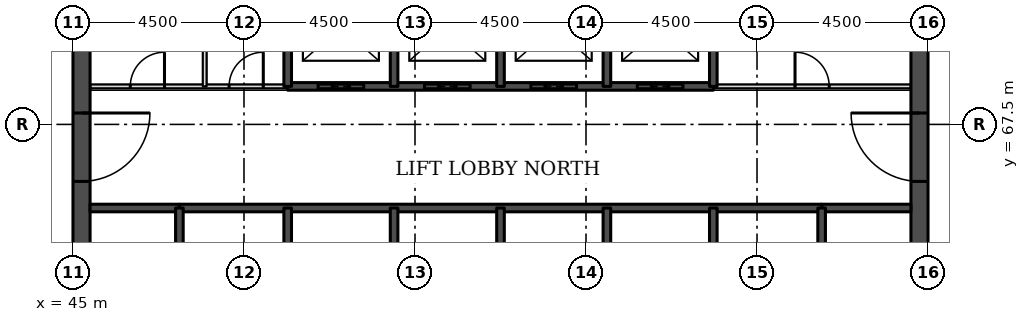
"""IFC4 building model, lengths in metres.
Left out: names, types, materials, properties, quantities, classifications, styles, units other than length and angle.
Written with IfcOpenShell. Run it as: python <this file> out.ifc"""

import sys

from ifc_helpers import new_model, si_unit, direction, frame, frame_2d, origin, place, context, subcontext, project, spatial, rectangle, extrude, element, fill, save


model = new_model("IFC4")
c1 = context("Model", 3, precision=1e-05, world=origin(), true_north=direction((0.0, 1.0)))
c2 = subcontext(c1, "Body", "Model", "MODEL_VIEW")
j1 = project(units=[si_unit("LENGTHUNIT", "METRE"), si_unit("PLANEANGLEUNIT", "RADIAN")], contexts=[c1])
p1 = place(None, origin())
s1 = spatial("IfcSite", under=j1, at=p1, CompositionType="ELEMENT")
p2 = place(p1, origin())
s2 = spatial("IfcBuilding", under=s1, at=p2, CompositionType="ELEMENT")
p3 = place(p2, frame((0.0, 0.0, 74.3)))
s3 = spatial("IfcBuildingStorey", under=s2, at=p3, CompositionType="ELEMENT", Elevation=74.3)
p4 = place(p3, frame((45.225, 49.5, 0.0), z_axis=(0.0, 0.0, 1.0), x_axis=(0.0, 1.0, 0.0)))
e1 = element("IfcWall", 1, at=p4, inside=s3, PredefinedType="SHEAR", context=c2, shape_type="SweptSolid", body=[
    extrude(rectangle(XDim=22.5, YDim=0.45, at=frame_2d((11.25, 0.0))), origin(), (0.0, 0.0, 1.0), 4.6),
])
p5 = place(p4, frame((4.2, 0.0, 0.0)))
e2 = element("IfcOpeningElement", 2, at=p5, cuts=e1, PredefinedType="OPENING", context=c2, shape_type="SweptSolid", body=[
    extrude(rectangle(XDim=1.8, YDim=2.1, at=frame_2d((0.9, 1.05))), frame((0.0, 0.235, 0.0), z_axis=(0.0, -1.0, 0.0), x_axis=(1.0, 0.0, 0.0)), (0.0, 0.0, 1.0), 0.47),
])
p6 = place(p4, frame((6.9, 0.0, 0.0)))
e3 = element("IfcOpeningElement", 3, at=p6, cuts=e1, PredefinedType="OPENING", context=c2, shape_type="SweptSolid", body=[
    extrude(rectangle(XDim=1.1, YDim=2.1, at=frame_2d((0.55, 1.05))), frame((0.0, 0.235, 0.0), z_axis=(0.0, -1.0, 0.0), x_axis=(1.0, 0.0, 0.0)), (0.0, 0.0, 1.0), 0.47),
])
p7 = place(p4, frame((13.6, 0.0, 0.0)))
e4 = element("IfcOpeningElement", 4, at=p7, cuts=e1, PredefinedType="OPENING", context=c2, shape_type="SweptSolid", body=[
    extrude(rectangle(XDim=1.1, YDim=2.1, at=frame_2d((0.55, 1.05))), frame((0.0, 0.235, 0.0), z_axis=(0.0, -1.0, 0.0), x_axis=(1.0, 0.0, 0.0)), (0.0, 0.0, 1.0), 0.47),
])
p8 = place(p4, frame((16.5, 0.0, 0.0)))
e5 = element("IfcOpeningElement", 5, at=p8, cuts=e1, PredefinedType="OPENING", context=c2, shape_type="SweptSolid", body=[
    extrude(rectangle(XDim=1.8, YDim=2.1, at=frame_2d((0.9, 1.05))), frame((0.0, 0.235, 0.0), z_axis=(0.0, -1.0, 0.0), x_axis=(1.0, 0.0, 0.0)), (0.0, 0.0, 1.0), 0.47),
])
p9 = place(p3, frame((67.275, 49.5, 0.0), z_axis=(0.0, 0.0, 1.0), x_axis=(0.0, 1.0, 0.0)))
e6 = element("IfcWall", 6, at=p9, inside=s3, PredefinedType="SHEAR", context=c2, shape_type="SweptSolid", body=[
    extrude(rectangle(XDim=22.5, YDim=0.45, at=frame_2d((11.25, 0.0))), origin(), (0.0, 0.0, 1.0), 4.6),
])
p10 = place(p9, frame((4.2, 0.0, 0.0)))
e7 = element("IfcOpeningElement", 7, at=p10, cuts=e6, PredefinedType="OPENING", context=c2, shape_type="SweptSolid", body=[
    extrude(rectangle(XDim=1.8, YDim=2.1, at=frame_2d((0.9, 1.05))), frame((0.0, 0.235, 0.0), z_axis=(0.0, -1.0, 0.0), x_axis=(1.0, 0.0, 0.0)), (0.0, 0.0, 1.0), 0.47),
])
p11 = place(p9, frame((6.9, 0.0, 0.0)))
e8 = element("IfcOpeningElement", 8, at=p11, cuts=e6, PredefinedType="OPENING", context=c2, shape_type="SweptSolid", body=[
    extrude(rectangle(XDim=1.1, YDim=2.1, at=frame_2d((0.55, 1.05))), frame((0.0, 0.235, 0.0), z_axis=(0.0, -1.0, 0.0), x_axis=(1.0, 0.0, 0.0)), (0.0, 0.0, 1.0), 0.47),
])
p12 = place(p9, frame((13.6, 0.0, 0.0)))
e9 = element("IfcOpeningElement", 9, at=p12, cuts=e6, PredefinedType="OPENING", context=c2, shape_type="SweptSolid", body=[
    extrude(rectangle(XDim=1.1, YDim=2.1, at=frame_2d((0.55, 1.05))), frame((0.0, 0.235, 0.0), z_axis=(0.0, -1.0, 0.0), x_axis=(1.0, 0.0, 0.0)), (0.0, 0.0, 1.0), 0.47),
])
p13 = place(p9, frame((16.5, 0.0, 0.0)))
e10 = element("IfcOpeningElement", 10, at=p13, cuts=e6, PredefinedType="OPENING", context=c2, shape_type="SweptSolid", body=[
    extrude(rectangle(XDim=1.8, YDim=2.1, at=frame_2d((0.9, 1.05))), frame((0.0, 0.235, 0.0), z_axis=(0.0, -1.0, 0.0), x_axis=(1.0, 0.0, 0.0)), (0.0, 0.0, 1.0), 0.47),
])
for number, where, z_axis, x_axis in (
    (11, (45.45, 65.3, 0.0), (0.0, 0.0, 1.0), (1.0, 0.0, 0.0)),
    (12, (64.7, 65.3, 0.0), (0.0, 0.0, 1.0), (1.0, 0.0, 0.0)),
):
    element("IfcWall", number, at=place(p3, frame(where, z_axis=z_axis, x_axis=x_axis)), inside=s3, PredefinedType="SOLIDWALL", context=c2, shape_type="SweptSolid", body=[
        extrude(rectangle(XDim=2.35, YDim=0.2, at=frame_2d((1.175, 0.0))), origin(), (0.0, 0.0, 1.0), 4.45),
    ])
p14 = place(p3, frame((47.8, 65.3, 0.0), z_axis=(0.0, 0.0, 1.0), x_axis=(1.0, 0.0, 0.0)))
e13 = element("IfcWall", 13, at=p14, inside=s3, PredefinedType="SOLIDWALL", context=c2, shape_type="SweptSolid", body=[
    extrude(rectangle(XDim=16.9, YDim=0.2, at=frame_2d((8.45, 0.0))), origin(), (0.0, 0.0, 1.0), 4.45),
])
p15 = place(p3, frame((45.45, 68.5, 0.0), z_axis=(0.0, 0.0, 1.0), x_axis=(1.0, 0.0, 0.0)))
e14 = element("IfcWall", 14, at=p15, inside=s3, PredefinedType="PARTITIONING", context=c2, shape_type="SweptSolid", body=[
    extrude(rectangle(XDim=5.2, YDim=0.1, at=frame_2d((2.6, 0.0))), origin(), (0.0, 0.0, 1.0), 4.45),
])
p16 = place(p15, frame((1.058, 0.0, 0.0)))
e15 = element("IfcOpeningElement", 15, at=p16, cuts=e14, PredefinedType="OPENING", context=c2, shape_type="SweptSolid", body=[
    extrude(rectangle(XDim=0.9, YDim=2.1, at=frame_2d((0.45, 1.05))), frame((0.0, 0.06, 0.0), z_axis=(0.0, -1.0, 0.0), x_axis=(1.0, 0.0, 0.0)), (0.0, 0.0, 1.0), 0.12),
])
p17 = place(p15, frame((3.658, 0.0, 0.0)))
e16 = element("IfcOpeningElement", 16, at=p17, cuts=e14, PredefinedType="OPENING", context=c2, shape_type="SweptSolid", body=[
    extrude(rectangle(XDim=0.9, YDim=2.1, at=frame_2d((0.45, 1.05))), frame((0.0, 0.06, 0.0), z_axis=(0.0, -1.0, 0.0), x_axis=(1.0, 0.0, 0.0)), (0.0, 0.0, 1.0), 0.12),
])
p18 = place(p3, frame((61.85, 68.5, 0.0), z_axis=(0.0, 0.0, 1.0), x_axis=(1.0, 0.0, 0.0)))
e17 = element("IfcWall", 17, at=p18, inside=s3, PredefinedType="PARTITIONING", context=c2, shape_type="SweptSolid", body=[
    extrude(rectangle(XDim=5.2, YDim=0.1, at=frame_2d((2.6, 0.0))), origin(), (0.0, 0.0, 1.0), 4.45),
])
p19 = place(p18, frame((2.15, 0.0, 0.0)))
e18 = element("IfcOpeningElement", 18, at=p19, cuts=e17, PredefinedType="OPENING", context=c2, shape_type="SweptSolid", body=[
    extrude(rectangle(XDim=0.9, YDim=2.1, at=frame_2d((0.45, 1.05))), frame((0.0, 0.06, 0.0), z_axis=(0.0, -1.0, 0.0), x_axis=(1.0, 0.0, 0.0)), (0.0, 0.0, 1.0), 0.12),
])
p20 = place(p3, frame((50.65, 68.5, 0.0), z_axis=(0.0, 0.0, 1.0), x_axis=(1.0, 0.0, 0.0)))
e19 = element("IfcWall", 19, at=p20, inside=s3, PredefinedType="SOLIDWALL", context=c2, shape_type="SweptSolid", body=[
    extrude(rectangle(XDim=11.2, YDim=0.2, at=frame_2d((5.6, 0.0))), origin(), (0.0, 0.0, 1.0), 4.45),
])
p21 = place(p20, frame((0.8, 0.0, 0.0)))
e20 = element("IfcOpeningElement", 20, at=p21, cuts=e19, PredefinedType="OPENING", context=c2, shape_type="SweptSolid", body=[
    extrude(rectangle(XDim=1.2, YDim=2.1, at=frame_2d((0.6, 1.05))), frame((0.0, 0.11, 0.0), z_axis=(0.0, -1.0, 0.0), x_axis=(1.0, 0.0, 0.0)), (0.0, 0.0, 1.0), 0.22),
])
p22 = place(p20, frame((3.6, 0.0, 0.0)))
e21 = element("IfcOpeningElement", 21, at=p22, cuts=e19, PredefinedType="OPENING", context=c2, shape_type="SweptSolid", body=[
    extrude(rectangle(XDim=1.2, YDim=2.1, at=frame_2d((0.6, 1.05))), frame((0.0, 0.11, 0.0), z_axis=(0.0, -1.0, 0.0), x_axis=(1.0, 0.0, 0.0)), (0.0, 0.0, 1.0), 0.22),
])
p23 = place(p20, frame((6.4, 0.0, 0.0)))
e22 = element("IfcOpeningElement", 22, at=p23, cuts=e19, PredefinedType="OPENING", context=c2, shape_type="SweptSolid", body=[
    extrude(rectangle(XDim=1.2, YDim=2.1, at=frame_2d((0.6, 1.05))), frame((0.0, 0.11, 0.0), z_axis=(0.0, -1.0, 0.0), x_axis=(1.0, 0.0, 0.0)), (0.0, 0.0, 1.0), 0.22),
])
p24 = place(p20, frame((9.2, 0.0, 0.0)))
e23 = element("IfcOpeningElement", 23, at=p24, cuts=e19, PredefinedType="OPENING", context=c2, shape_type="SweptSolid", body=[
    extrude(rectangle(XDim=1.2, YDim=2.1, at=frame_2d((0.6, 1.05))), frame((0.0, 0.11, 0.0), z_axis=(0.0, -1.0, 0.0), x_axis=(1.0, 0.0, 0.0)), (0.0, 0.0, 1.0), 0.22),
])
p25 = place(p3, frame((47.8, 62.0, 0.0), z_axis=(0.0, 0.0, 1.0), x_axis=(0.0, 1.0, 0.0)))
e24 = element("IfcWall", 24, at=p25, inside=s3, PredefinedType="SOLIDWALL", context=c2, shape_type="SweptSolid", body=[
    extrude(rectangle(XDim=3.3, YDim=0.2, at=frame_2d((1.65, 0.0))), origin(), (0.0, 0.0, 1.0), 4.45),
])
p26 = place(p25, frame((1.1, 0.0, 0.0)))
e25 = element("IfcOpeningElement", 25, at=p26, cuts=e24, PredefinedType="OPENING", context=c2, shape_type="SweptSolid", body=[
    extrude(rectangle(XDim=1.1, YDim=2.1, at=frame_2d((0.55, 1.05))), frame((0.0, 0.11, 0.0), z_axis=(0.0, -1.0, 0.0), x_axis=(1.0, 0.0, 0.0)), (0.0, 0.0, 1.0), 0.22),
])
p27 = place(p3, frame((48.466, 68.5, 0.0), z_axis=(0.0, 0.0, 1.0), x_axis=(0.0, 1.0, 0.0)))
e26 = element("IfcWall", 26, at=p27, inside=s3, PredefinedType="PARTITIONING", context=c2, shape_type="SweptSolid", body=[
    extrude(rectangle(XDim=3.05, YDim=0.1, at=frame_2d((1.525, 0.0))), origin(), (0.0, 0.0, 1.0), 4.45),
])
p28 = place(p3, frame((50.65, 62.0, 0.0), z_axis=(0.0, 0.0, 1.0), x_axis=(0.0, 1.0, 0.0)))
e27 = element("IfcWall", 27, at=p28, inside=s3, PredefinedType="SOLIDWALL", context=c2, shape_type="SweptSolid", body=[
    extrude(rectangle(XDim=3.3, YDim=0.2, at=frame_2d((1.65, 0.0))), origin(), (0.0, 0.0, 1.0), 4.45),
])
p29 = place(p3, frame((50.65, 68.5, 0.0), z_axis=(0.0, 0.0, 1.0), x_axis=(0.0, 1.0, 0.0)))
e28 = element("IfcWall", 28, at=p29, inside=s3, PredefinedType="SOLIDWALL", context=c2, shape_type="SweptSolid", body=[
    extrude(rectangle(XDim=3.05, YDim=0.2, at=frame_2d((1.525, 0.0))), origin(), (0.0, 0.0, 1.0), 4.45),
])
p30 = place(p3, frame((53.45, 62.5, 0.0), z_axis=(0.0, 0.0, 1.0), x_axis=(0.0, 1.0, 0.0)))
e29 = element("IfcWall", 29, at=p30, inside=s3, PredefinedType="SOLIDWALL", context=c2, shape_type="SweptSolid", body=[
    extrude(rectangle(XDim=2.8, YDim=0.2, at=frame_2d((1.4, 0.0))), origin(), (0.0, 0.0, 1.0), 4.45),
])
p31 = place(p3, frame((53.45, 68.5, 0.0), z_axis=(0.0, 0.0, 1.0), x_axis=(0.0, 1.0, 0.0)))
e30 = element("IfcWall", 30, at=p31, inside=s3, PredefinedType="SOLIDWALL", context=c2, shape_type="SweptSolid", body=[
    extrude(rectangle(XDim=3.05, YDim=0.2, at=frame_2d((1.525, 0.0))), origin(), (0.0, 0.0, 1.0), 4.45),
])
p32 = place(p3, frame((56.25, 62.5, 0.0), z_axis=(0.0, 0.0, 1.0), x_axis=(0.0, 1.0, 0.0)))
e31 = element("IfcWall", 31, at=p32, inside=s3, PredefinedType="SOLIDWALL", context=c2, shape_type="SweptSolid", body=[
    extrude(rectangle(XDim=2.8, YDim=0.2, at=frame_2d((1.4, 0.0))), origin(), (0.0, 0.0, 1.0), 4.45),
])
p33 = place(p3, frame((56.25, 68.5, 0.0), z_axis=(0.0, 0.0, 1.0), x_axis=(0.0, 1.0, 0.0)))
e32 = element("IfcWall", 32, at=p33, inside=s3, PredefinedType="SOLIDWALL", context=c2, shape_type="SweptSolid", body=[
    extrude(rectangle(XDim=3.05, YDim=0.2, at=frame_2d((1.525, 0.0))), origin(), (0.0, 0.0, 1.0), 4.45),
])
p34 = place(p3, frame((59.05, 62.5, 0.0), z_axis=(0.0, 0.0, 1.0), x_axis=(0.0, 1.0, 0.0)))
e33 = element("IfcWall", 33, at=p34, inside=s3, PredefinedType="SOLIDWALL", context=c2, shape_type="SweptSolid", body=[
    extrude(rectangle(XDim=2.8, YDim=0.2, at=frame_2d((1.4, 0.0))), origin(), (0.0, 0.0, 1.0), 4.45),
])
p35 = place(p3, frame((59.05, 68.5, 0.0), z_axis=(0.0, 0.0, 1.0), x_axis=(0.0, 1.0, 0.0)))
e34 = element("IfcWall", 34, at=p35, inside=s3, PredefinedType="SOLIDWALL", context=c2, shape_type="SweptSolid", body=[
    extrude(rectangle(XDim=3.05, YDim=0.2, at=frame_2d((1.525, 0.0))), origin(), (0.0, 0.0, 1.0), 4.45),
])
p36 = place(p3, frame((61.85, 62.0, 0.0), z_axis=(0.0, 0.0, 1.0), x_axis=(0.0, 1.0, 0.0)))
e35 = element("IfcWall", 35, at=p36, inside=s3, PredefinedType="SOLIDWALL", context=c2, shape_type="SweptSolid", body=[
    extrude(rectangle(XDim=3.3, YDim=0.2, at=frame_2d((1.65, 0.0))), origin(), (0.0, 0.0, 1.0), 4.45),
])
p37 = place(p3, frame((61.85, 68.5, 0.0), z_axis=(0.0, 0.0, 1.0), x_axis=(0.0, 1.0, 0.0)))
e36 = element("IfcWall", 36, at=p37, inside=s3, PredefinedType="SOLIDWALL", context=c2, shape_type="SweptSolid", body=[
    extrude(rectangle(XDim=3.05, YDim=0.2, at=frame_2d((1.525, 0.0))), origin(), (0.0, 0.0, 1.0), 4.45),
])
p38 = place(p3, frame((64.7, 62.0, 0.0), z_axis=(0.0, 0.0, 1.0), x_axis=(0.0, 1.0, 0.0)))
e37 = element("IfcWall", 37, at=p38, inside=s3, PredefinedType="SOLIDWALL", context=c2, shape_type="SweptSolid", body=[
    extrude(rectangle(XDim=3.3, YDim=0.2, at=frame_2d((1.65, 0.0))), origin(), (0.0, 0.0, 1.0), 4.45),
])
p39 = place(p38, frame((1.1, 0.0, 0.0)))
e38 = element("IfcOpeningElement", 38, at=p39, cuts=e37, PredefinedType="OPENING", context=c2, shape_type="SweptSolid", body=[
    extrude(rectangle(XDim=1.1, YDim=2.1, at=frame_2d((0.55, 1.05))), frame((0.0, 0.11, 0.0), z_axis=(0.0, -1.0, 0.0), x_axis=(1.0, 0.0, 0.0)), (0.0, 0.0, 1.0), 0.22),
])
p40 = place(p21, origin())
e39 = element("IfcDoor", 39, at=p40, inside=s3, OperationType="DOUBLE_DOOR_SLIDING", PredefinedType="DOOR", context=c2, shape_type="SweptSolid", body=[
    extrude(rectangle(XDim=1.2, YDim=2.1, at=frame_2d((0.6, 1.05))), frame((0.0, 0.025, 0.0), z_axis=(0.0, -1.0, 0.0), x_axis=(1.0, 0.0, 0.0)), (0.0, 0.0, 1.0), 0.05),
])
fill(e20, e39)
p41 = place(p22, origin())
e40 = element("IfcDoor", 40, at=p41, inside=s3, OperationType="DOUBLE_DOOR_SLIDING", PredefinedType="DOOR", context=c2, shape_type="SweptSolid", body=[
    extrude(rectangle(XDim=1.2, YDim=2.1, at=frame_2d((0.6, 1.05))), frame((0.0, 0.025, 0.0), z_axis=(0.0, -1.0, 0.0), x_axis=(1.0, 0.0, 0.0)), (0.0, 0.0, 1.0), 0.05),
])
fill(e21, e40)
p42 = place(p23, origin())
e41 = element("IfcDoor", 41, at=p42, inside=s3, OperationType="DOUBLE_DOOR_SLIDING", PredefinedType="DOOR", context=c2, shape_type="SweptSolid", body=[
    extrude(rectangle(XDim=1.2, YDim=2.1, at=frame_2d((0.6, 1.05))), frame((0.0, 0.025, 0.0), z_axis=(0.0, -1.0, 0.0), x_axis=(1.0, 0.0, 0.0)), (0.0, 0.0, 1.0), 0.05),
])
fill(e22, e41)
p43 = place(p24, origin())
e42 = element("IfcDoor", 42, at=p43, inside=s3, OperationType="DOUBLE_DOOR_SLIDING", PredefinedType="DOOR", context=c2, shape_type="SweptSolid", body=[
    extrude(rectangle(XDim=1.2, YDim=2.1, at=frame_2d((0.6, 1.05))), frame((0.0, 0.025, 0.0), z_axis=(0.0, -1.0, 0.0), x_axis=(1.0, 0.0, 0.0)), (0.0, 0.0, 1.0), 0.05),
])
fill(e23, e42)
p44 = place(p8, frame((1.8, 0.0, 0.0), z_axis=(0.0, 0.0, 1.0), x_axis=(-1.0, 0.0, 0.0)))
e43 = element("IfcDoor", 43, at=p44, inside=s3, OperationType="SINGLE_SWING_LEFT", PredefinedType="DOOR", context=c2, shape_type="SweptSolid", body=[
    extrude(rectangle(XDim=1.8, YDim=2.1, at=frame_2d((0.9, 1.05))), frame((0.0, 0.025, 0.0), z_axis=(0.0, -1.0, 0.0), x_axis=(1.0, 0.0, 0.0)), (0.0, 0.0, 1.0), 0.05),
])
fill(e5, e43)
p45 = place(p13, origin())
e44 = element("IfcDoor", 44, at=p45, inside=s3, OperationType="SINGLE_SWING_RIGHT", PredefinedType="DOOR", context=c2, shape_type="SweptSolid", body=[
    extrude(rectangle(XDim=1.8, YDim=2.1, at=frame_2d((0.9, 1.05))), frame((0.0, 0.025, 0.0), z_axis=(0.0, -1.0, 0.0), x_axis=(1.0, 0.0, 0.0)), (0.0, 0.0, 1.0), 0.05),
])
fill(e10, e44)
p46 = place(p19, origin())
e45 = element("IfcDoor", 45, at=p46, inside=s3, OperationType="SINGLE_SWING_LEFT", PredefinedType="DOOR", context=c2, shape_type="SweptSolid", body=[
    extrude(rectangle(XDim=0.9, YDim=2.1, at=frame_2d((0.45, 1.05))), frame((0.0, 0.025, 0.0), z_axis=(0.0, -1.0, 0.0), x_axis=(1.0, 0.0, 0.0)), (0.0, 0.0, 1.0), 0.05),
])
fill(e18, e45)
p47 = place(p16, origin())
e46 = element("IfcDoor", 46, at=p47, inside=s3, OperationType="SINGLE_SWING_RIGHT", PredefinedType="DOOR", context=c2, shape_type="SweptSolid", body=[
    extrude(rectangle(XDim=0.9, YDim=2.1, at=frame_2d((0.45, 1.05))), frame((0.0, 0.025, 0.0), z_axis=(0.0, -1.0, 0.0), x_axis=(1.0, 0.0, 0.0)), (0.0, 0.0, 1.0), 0.05),
])
fill(e15, e46)
p48 = place(p17, origin())
e47 = element("IfcDoor", 47, at=p48, inside=s3, OperationType="SINGLE_SWING_RIGHT", PredefinedType="DOOR", context=c2, shape_type="SweptSolid", body=[
    extrude(rectangle(XDim=0.9, YDim=2.1, at=frame_2d((0.45, 1.05))), frame((0.0, 0.025, 0.0), z_axis=(0.0, -1.0, 0.0), x_axis=(1.0, 0.0, 0.0)), (0.0, 0.0, 1.0), 0.05),
])
fill(e16, e47)
save(model, sys.argv[1])
